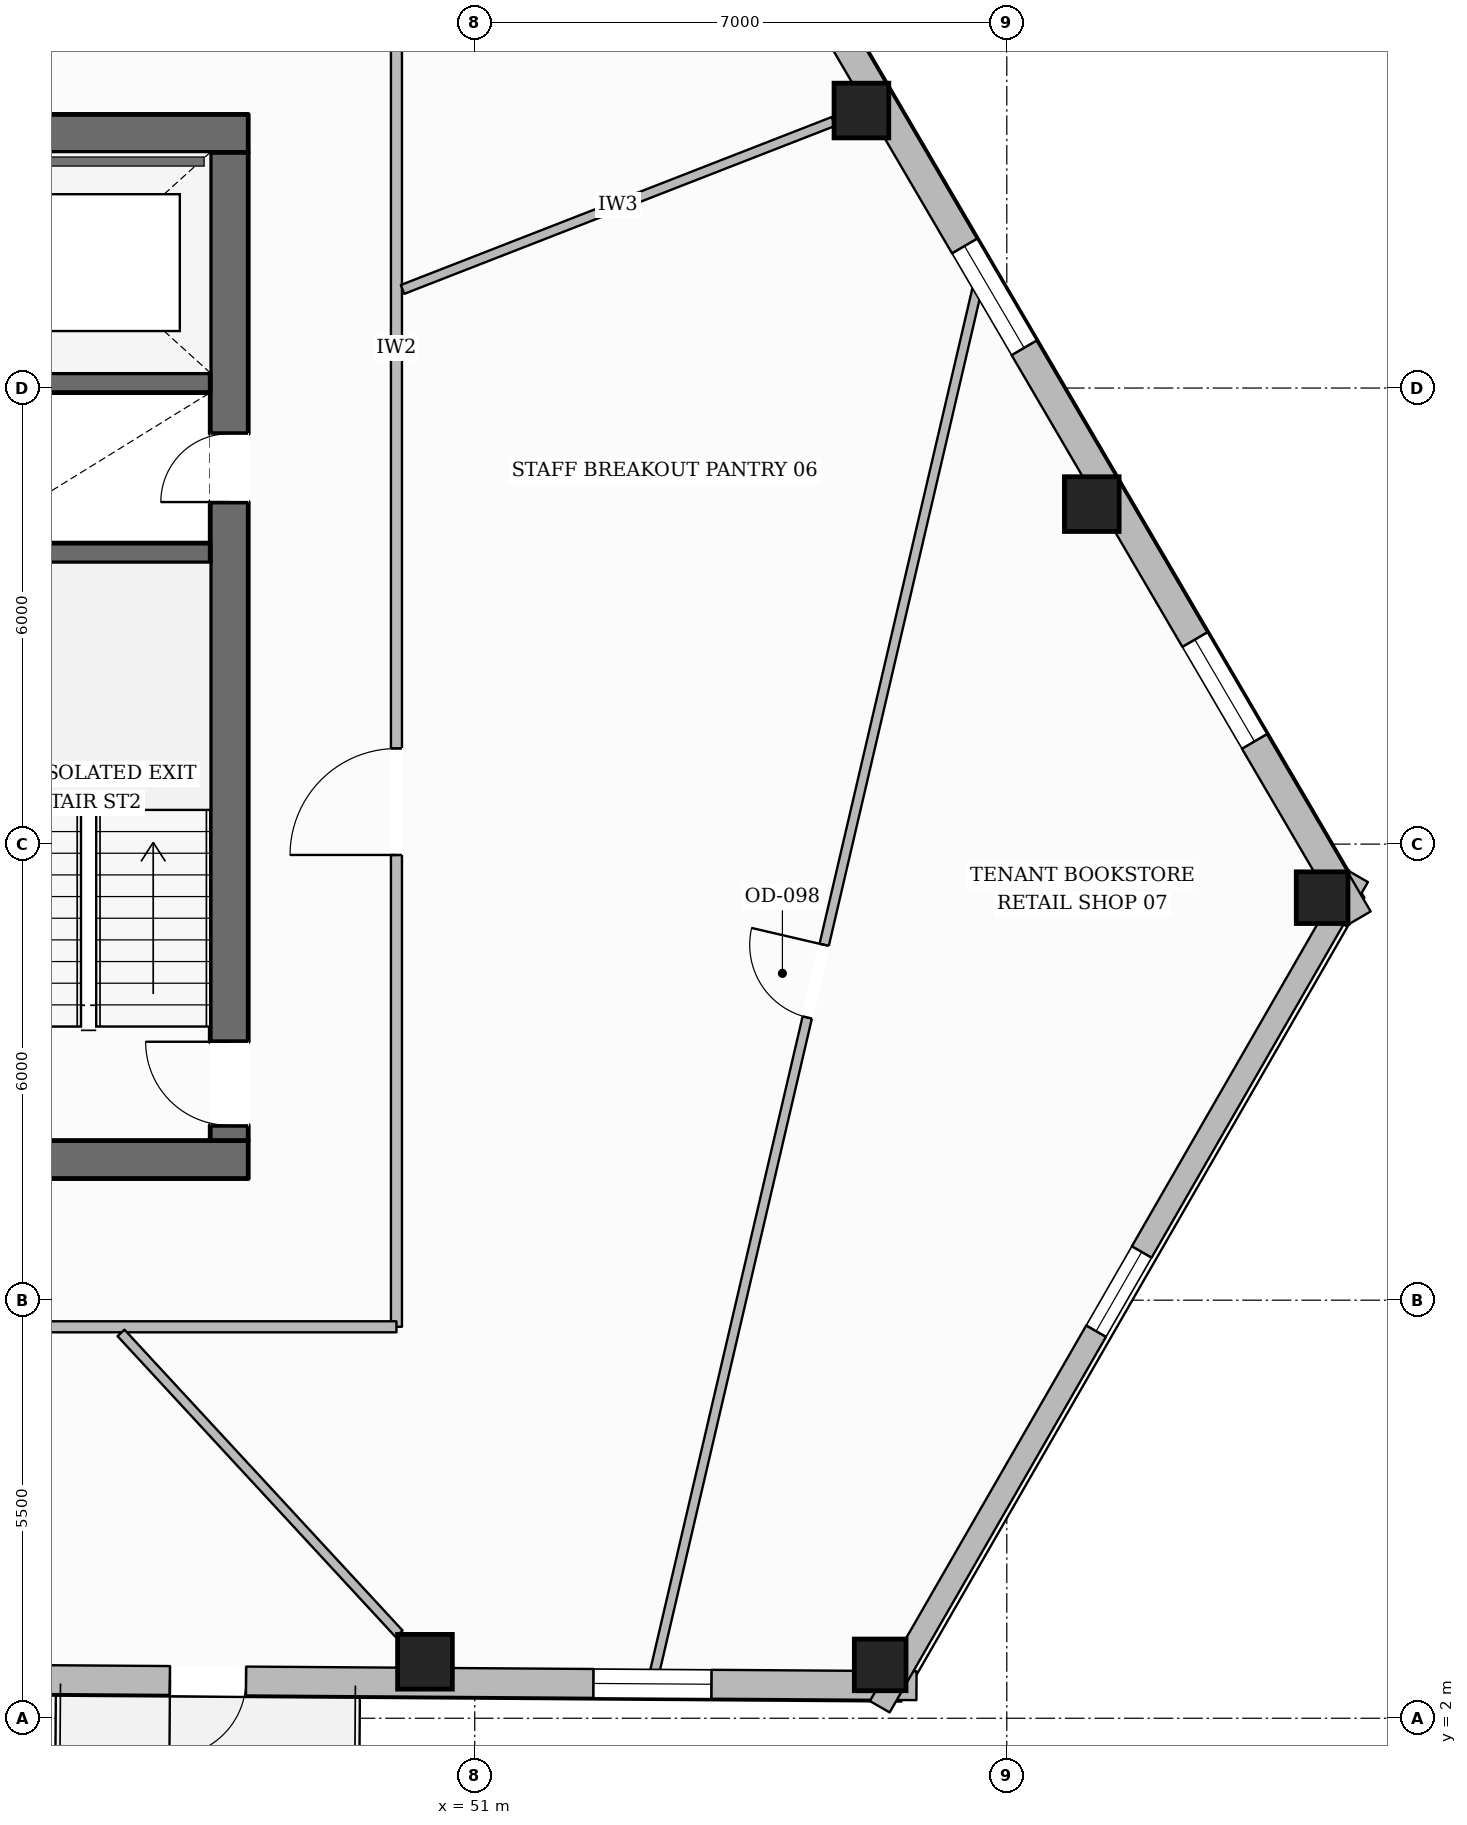
"""IFC4 building model, lengths in metres.
Left out: names, types, materials, properties, quantities, classifications, styles, units other than length and angle.
Written with IfcOpenShell. Run it as: python <this file> out.ifc"""

import sys

from ifc_helpers import new_model, si_unit, direction, frame, frame_2d, origin, origin_2d, place, context, subcontext, project, spatial, rectangle, hollow_rectangle, extrude, element, fill, save


model = new_model("IFC4")
c1 = context("Model", 3, precision=1e-05, world=origin(), true_north=direction((0.0, 1.0)))
c2 = subcontext(c1, "Body", "Model", "MODEL_VIEW")
j1 = project(units=[si_unit("LENGTHUNIT", "METRE"), si_unit("PLANEANGLEUNIT", "RADIAN")], contexts=[c1])
p1 = place(None, origin())
s1 = spatial("IfcSite", under=j1, at=p1, CompositionType="ELEMENT")
p2 = place(p1, origin())
s2 = spatial("IfcBuilding", under=s1, at=p2, CompositionType="ELEMENT")
p3 = place(p2, frame((0.0, 0.0, 120.15)))
s3 = spatial("IfcBuildingStorey", under=s2, at=p3, CompositionType="ELEMENT", Elevation=120.15)
p4 = place(p3, frame((27.98, 9.35, 0.0), z_axis=(0.0, 0.0, 1.0), x_axis=(1.0, 0.0, 0.0)))
e1 = element("IfcWall", 1, at=p4, inside=s3, PredefinedType="SOLIDWALL", context=c2, shape_type="SweptSolid", body=[
    extrude(rectangle(XDim=20.04, YDim=0.5, at=frame_2d((10.02, 0.0))), origin(), (0.0, 0.0, 1.0), 3.6),
])
p5 = place(p4, frame((10.52, 0.0, 0.0)))
e2 = element("IfcOpeningElement", 2, at=p5, cuts=e1, PredefinedType="OPENING", context=c2, shape_type="SweptSolid", body=[
    extrude(rectangle(XDim=1.4, YDim=2.2, at=frame_2d((0.7, 1.1))), frame((0.0, 0.26, 0.0), z_axis=(0.0, -1.0, 0.0), x_axis=(1.0, 0.0, 0.0)), (0.0, 0.0, 1.0), 0.52),
])
p6 = place(p3, frame((27.98, 22.85, 0.0), z_axis=(0.0, 0.0, 1.0), x_axis=(1.0, 0.0, 0.0)))
e3 = element("IfcWall", 3, at=p6, inside=s3, PredefinedType="SOLIDWALL", context=c2, shape_type="SweptSolid", body=[
    extrude(rectangle(XDim=20.04, YDim=0.5, at=frame_2d((10.02, 0.0))), origin(), (0.0, 0.0, 1.0), 3.6),
])
p7 = place(p6, frame((6.295, 0.0, 0.0)))
e4 = element("IfcOpeningElement", 4, at=p7, cuts=e3, PredefinedType="OPENING", context=c2, shape_type="SweptSolid", body=[
    extrude(rectangle(XDim=1.05, YDim=2.15, at=frame_2d((0.525, 1.075))), frame((0.0, 0.26, 0.0), z_axis=(0.0, -1.0, 0.0), x_axis=(1.0, 0.0, 0.0)), (0.0, 0.0, 1.0), 0.52),
])
p8 = place(p6, frame((12.695, 0.0, 0.0)))
e5 = element("IfcOpeningElement", 5, at=p8, cuts=e3, PredefinedType="OPENING", context=c2, shape_type="SweptSolid", body=[
    extrude(rectangle(XDim=1.05, YDim=2.15, at=frame_2d((0.525, 1.075))), frame((0.0, 0.26, 0.0), z_axis=(0.0, -1.0, 0.0), x_axis=(1.0, 0.0, 0.0)), (0.0, 0.0, 1.0), 0.52),
])
p9 = place(p3, frame((47.77, 9.6, 0.0), z_axis=(0.0, 0.0, 1.0), x_axis=(0.0, 1.0, 0.0)))
e6 = element("IfcWall", 6, at=p9, inside=s3, PredefinedType="SOLIDWALL", context=c2, shape_type="SweptSolid", body=[
    extrude(rectangle(XDim=13.0, YDim=0.5, at=frame_2d((6.5, 0.0))), origin(), (0.0, 0.0, 1.0), 3.6),
])
p10 = place(p9, frame((0.2, 0.0, 0.0)))
e7 = element("IfcOpeningElement", 7, at=p10, cuts=e6, PredefinedType="OPENING", context=c2, shape_type="SweptSolid", body=[
    extrude(rectangle(XDim=1.1, YDim=2.15, at=frame_2d((0.55, 1.075))), frame((0.0, 0.26, 0.0), z_axis=(0.0, -1.0, 0.0), x_axis=(1.0, 0.0, 0.0)), (0.0, 0.0, 1.0), 0.52),
])
p11 = place(p9, frame((8.4, 0.0, 0.0)))
e8 = element("IfcOpeningElement", 8, at=p11, cuts=e6, PredefinedType="OPENING", context=c2, shape_type="SweptSolid", body=[
    extrude(rectangle(XDim=0.9, YDim=2.1, at=frame_2d((0.45, 1.05))), frame((0.0, 0.26, 0.0), z_axis=(0.0, -1.0, 0.0), x_axis=(1.0, 0.0, 0.0)), (0.0, 0.0, 1.0), 0.52),
])
for number, where, z_axis, x_axis in (
    (9, (44.32, 17.33, 0.0), (0.0, 0.0, 1.0), (1.0, 0.0, 0.0)),
    (10, (44.32, 19.57, 0.0), (0.0, 0.0, 1.0), (1.0, 0.0, 0.0)),
):
    element("IfcWall", number, at=place(p3, frame(where, z_axis=z_axis, x_axis=x_axis)), inside=s3, PredefinedType="SHEAR", context=c2, shape_type="SweptSolid", body=[
        extrude(rectangle(XDim=3.2, YDim=0.26, at=frame_2d((1.6, 0.0))), origin(), (0.0, 0.0, 1.0), 3.6),
    ])
p12 = place(p3, frame((50.345, 2.743, 0.0), z_axis=(0.0, 0.0, 1.0), x_axis=(1.0, 0.0, 0.0)))
e11 = element("IfcColumn", 11, at=p12, inside=s3, PredefinedType="COLUMN", context=c2, shape_type="SweptSolid", body=[
    extrude(hollow_rectangle(XDim=0.72, YDim=0.72, WallThickness=0.032, at=origin_2d()), origin(), (0.0, 0.0, 1.0), 3.6),
])
for number, where, z_axis, x_axis in (
    (12, (56.334, 2.702, 0.0), (0.0, 0.0, 1.0), (1.0, 0.0, 0.0)),
    (13, (62.148, 12.795, 0.0), (0.0, 0.0, 1.0), (1.0, 0.0, 0.0)),
):
    element("IfcColumn", number, at=place(p3, frame(where, z_axis=z_axis, x_axis=x_axis)), inside=s3, PredefinedType="COLUMN", context=c2, shape_type="SweptSolid", body=[
        extrude(hollow_rectangle(XDim=0.68, YDim=0.68, WallThickness=0.03, at=origin_2d()), origin(), (0.0, 0.0, 1.0), 3.6),
    ])
for number, where, z_axis, x_axis in (
    (14, (59.118, 17.973, 0.0), (0.0, 0.0, 1.0), (1.0, 0.0, 0.0)),
    (15, (56.087, 23.151, 0.0), (0.0, 0.0, 1.0), (1.0, 0.0, 0.0)),
):
    element("IfcColumn", number, at=place(p3, frame(where, z_axis=z_axis, x_axis=x_axis)), inside=s3, PredefinedType="COLUMN", context=c2, shape_type="SweptSolid", body=[
        extrude(hollow_rectangle(XDim=0.72, YDim=0.72, WallThickness=0.032, at=origin_2d()), origin(), (0.0, 0.0, 1.0), 3.6),
    ])
p13 = place(p3, frame((56.812, 2.428, 0.0), z_axis=(0.0, 0.0, 1.0), x_axis=(-0.999975943084, 0.006936371743, 0.0)))
e16 = element("IfcWall", 16, at=p13, inside=s3, PredefinedType="STANDARD", context=c2, shape_type="SweptSolid", body=[
    extrude(rectangle(XDim=36.887, YDim=0.38, at=frame_2d((18.443, 0.0))), origin(), (0.0, 0.0, 1.0), 3.059),
])
p14 = place(p13, frame((8.822, 0.0, 0.0)))
e17 = element("IfcOpeningElement", 17, at=p14, cuts=e16, PredefinedType="OPENING", context=c2, shape_type="SweptSolid", body=[
    extrude(rectangle(XDim=1.0, YDim=2.2, at=frame_2d((0.5, 1.1))), frame((0.0, 0.2, 0.0), z_axis=(0.0, -1.0, 0.0), x_axis=(1.0, 0.0, 0.0)), (0.0, 0.0, 1.0), 0.4),
])
p15 = place(p13, frame((32.644, 0.0, 0.65)))
e18 = element("IfcOpeningElement", 18, at=p15, cuts=e16, PredefinedType="OPENING", context=c2, shape_type="SweptSolid", body=[
    extrude(rectangle(XDim=1.55, YDim=1.75, at=frame_2d((0.775, 0.875))), frame((0.0, 0.2, 0.0), z_axis=(0.0, -1.0, 0.0), x_axis=(1.0, 0.0, 0.0)), (0.0, 0.0, 1.0), 0.4),
])
p16 = place(p13, frame((26.655, 0.0, 0.65)))
e19 = element("IfcOpeningElement", 19, at=p16, cuts=e16, PredefinedType="OPENING", context=c2, shape_type="SweptSolid", body=[
    extrude(rectangle(XDim=1.55, YDim=1.75, at=frame_2d((0.775, 0.875))), frame((0.0, 0.2, 0.0), z_axis=(0.0, -1.0, 0.0), x_axis=(1.0, 0.0, 0.0)), (0.0, 0.0, 1.0), 0.4),
])
p17 = place(p13, frame((20.666, 0.0, 0.65)))
e20 = element("IfcOpeningElement", 20, at=p17, cuts=e16, PredefinedType="OPENING", context=c2, shape_type="SweptSolid", body=[
    extrude(rectangle(XDim=1.55, YDim=1.75, at=frame_2d((0.775, 0.875))), frame((0.0, 0.2, 0.0), z_axis=(0.0, -1.0, 0.0), x_axis=(1.0, 0.0, 0.0)), (0.0, 0.0, 1.0), 0.4),
])
p18 = place(p13, frame((2.699, 0.0, 0.65)))
e21 = element("IfcOpeningElement", 21, at=p18, cuts=e16, PredefinedType="OPENING", context=c2, shape_type="SweptSolid", body=[
    extrude(rectangle(XDim=1.55, YDim=1.75, at=frame_2d((0.775, 0.875))), frame((0.0, 0.2, 0.0), z_axis=(0.0, -1.0, 0.0), x_axis=(1.0, 0.0, 0.0)), (0.0, 0.0, 1.0), 0.4),
])
p19 = place(p3, frame((62.621, 13.075, 0.0), z_axis=(0.0, 0.0, 1.0), x_axis=(-0.499135001454, -0.866524235278, 0.0)))
e22 = element("IfcWall", 22, at=p19, inside=s3, PredefinedType="STANDARD", context=c2, shape_type="SweptSolid", body=[
    extrude(rectangle(XDim=12.607, YDim=0.3, at=frame_2d((6.303, 0.0))), origin(), (0.0, 0.0, 1.0), 3.059),
])
p20 = place(p19, frame((5.704, 0.0, 0.65)))
e23 = element("IfcOpeningElement", 23, at=p20, cuts=e22, PredefinedType="OPENING", context=c2, shape_type="SweptSolid", body=[
    extrude(rectangle(XDim=1.2, YDim=1.7, at=frame_2d((0.6, 0.85))), frame((0.0, 0.16, 0.0), z_axis=(0.0, -1.0, 0.0), x_axis=(1.0, 0.0, 0.0)), (0.0, 0.0, 1.0), 0.32),
])
p21 = place(p3, frame((43.959, 44.406, 0.0), z_axis=(0.0, 0.0, 1.0), x_axis=(0.50514079069, -0.863036952616, 0.0)))
e24 = element("IfcWall", 24, at=p21, inside=s3, PredefinedType="STANDARD", context=c2, shape_type="SweptSolid", body=[
    extrude(rectangle(XDim=36.948, YDim=0.38, at=frame_2d((18.474, 0.0))), origin(), (0.0, 0.0, 1.0), 3.059),
])
p22 = place(p21, frame((32.695, 0.0, 0.65)))
e25 = element("IfcOpeningElement", 25, at=p22, cuts=e24, PredefinedType="OPENING", context=c2, shape_type="SweptSolid", body=[
    extrude(rectangle(XDim=1.55, YDim=1.75, at=frame_2d((0.775, 0.875))), frame((0.0, 0.2, 0.0), z_axis=(0.0, -1.0, 0.0), x_axis=(1.0, 0.0, 0.0)), (0.0, 0.0, 1.0), 0.4),
])
p23 = place(p21, frame((26.696, 0.0, 0.65)))
e26 = element("IfcOpeningElement", 26, at=p23, cuts=e24, PredefinedType="OPENING", context=c2, shape_type="SweptSolid", body=[
    extrude(rectangle(XDim=1.55, YDim=1.75, at=frame_2d((0.775, 0.875))), frame((0.0, 0.2, 0.0), z_axis=(0.0, -1.0, 0.0), x_axis=(1.0, 0.0, 0.0)), (0.0, 0.0, 1.0), 0.4),
])
p24 = place(p21, frame((20.696, 0.0, 0.65)))
e27 = element("IfcOpeningElement", 27, at=p24, cuts=e24, PredefinedType="OPENING", context=c2, shape_type="SweptSolid", body=[
    extrude(rectangle(XDim=1.55, YDim=1.75, at=frame_2d((0.775, 0.875))), frame((0.0, 0.2, 0.0), z_axis=(0.0, -1.0, 0.0), x_axis=(1.0, 0.0, 0.0)), (0.0, 0.0, 1.0), 0.4),
])
p25 = place(p21, frame((8.697, 0.0, 0.65)))
e28 = element("IfcOpeningElement", 28, at=p25, cuts=e24, PredefinedType="OPENING", context=c2, shape_type="SweptSolid", body=[
    extrude(rectangle(XDim=1.55, YDim=1.75, at=frame_2d((0.775, 0.875))), frame((0.0, 0.2, 0.0), z_axis=(0.0, -1.0, 0.0), x_axis=(1.0, 0.0, 0.0)), (0.0, 0.0, 1.0), 0.4),
])
p26 = place(p21, frame((2.698, 0.0, 0.65)))
e29 = element("IfcOpeningElement", 29, at=p26, cuts=e24, PredefinedType="OPENING", context=c2, shape_type="SweptSolid", body=[
    extrude(rectangle(XDim=1.55, YDim=1.75, at=frame_2d((0.775, 0.875))), frame((0.0, 0.2, 0.0), z_axis=(0.0, -1.0, 0.0), x_axis=(1.0, 0.0, 0.0)), (0.0, 0.0, 1.0), 0.4),
])
p27 = place(p3, frame((49.97, 7.15, 0.0), z_axis=(0.0, 0.0, 1.0), x_axis=(0.0, 1.0, 0.0)))
e30 = element("IfcWall", 30, at=p27, inside=s3, PredefinedType="PARTITIONING", context=c2, shape_type="SweptSolid", body=[
    extrude(rectangle(XDim=17.9, YDim=0.145, at=frame_2d((8.95, 0.0))), origin(), (0.0, 0.0, 1.0), 3.288),
])
p28 = place(p27, frame((6.208, 0.0, 0.0)))
e31 = element("IfcOpeningElement", 31, at=p28, cuts=e30, PredefinedType="OPENING", context=c2, shape_type="SweptSolid", body=[
    extrude(rectangle(XDim=1.4, YDim=2.2, at=frame_2d((0.7, 1.1))), frame((0.0, 0.083, 0.0), z_axis=(0.0, -1.0, 0.0), x_axis=(1.0, 0.0, 0.0)), (0.0, 0.0, 1.0), 0.165),
])
p29 = place(p3, frame((26.03, 7.15, 0.0), z_axis=(0.0, 0.0, 1.0), x_axis=(1.0, 0.0, 0.0)))
e32 = element("IfcWall", 32, at=p29, inside=s3, PredefinedType="PARTITIONING", context=c2, shape_type="SweptSolid", body=[
    extrude(rectangle(XDim=23.94, YDim=0.145, at=frame_2d((11.97, 0.0))), origin(), (0.0, 0.0, 1.0), 3.6),
])
p30 = place(p29, frame((4.53, 0.0, 0.0)))
e33 = element("IfcOpeningElement", 33, at=p30, cuts=e32, PredefinedType="OPENING", context=c2, shape_type="SweptSolid", body=[
    extrude(rectangle(XDim=0.88, YDim=2.1, at=frame_2d((0.44, 1.05))), frame((0.0, 0.083, 0.0), z_axis=(0.0, -1.0, 0.0), x_axis=(1.0, 0.0, 0.0)), (0.0, 0.0, 1.0), 0.165),
])
p31 = place(p29, frame((7.05, 0.0, 0.0)))
e34 = element("IfcOpeningElement", 34, at=p31, cuts=e32, PredefinedType="OPENING", context=c2, shape_type="SweptSolid", body=[
    extrude(rectangle(XDim=0.88, YDim=2.1, at=frame_2d((0.44, 1.05))), frame((0.0, 0.083, 0.0), z_axis=(0.0, -1.0, 0.0), x_axis=(1.0, 0.0, 0.0)), (0.0, 0.0, 1.0), 0.165),
])
p32 = place(p29, frame((9.43, 0.0, 0.0)))
e35 = element("IfcOpeningElement", 35, at=p32, cuts=e32, PredefinedType="OPENING", context=c2, shape_type="SweptSolid", body=[
    extrude(rectangle(XDim=0.96, YDim=2.1, at=frame_2d((0.48, 1.05))), frame((0.0, 0.083, 0.0), z_axis=(0.0, -1.0, 0.0), x_axis=(1.0, 0.0, 0.0)), (0.0, 0.0, 1.0), 0.165),
])
p33 = place(p29, frame((14.946, 0.0, 0.0)))
e36 = element("IfcOpeningElement", 36, at=p33, cuts=e32, PredefinedType="OPENING", context=c2, shape_type="SweptSolid", body=[
    extrude(rectangle(XDim=1.4, YDim=2.2, at=frame_2d((0.7, 1.1))), frame((0.0, 0.083, 0.0), z_axis=(0.0, -1.0, 0.0), x_axis=(1.0, 0.0, 0.0)), (0.0, 0.0, 1.0), 0.165),
])
p34 = place(p3, frame((50.051, 20.798, 0.0), z_axis=(0.0, 0.0, 1.0), x_axis=(0.931714445964, 0.363191672786, 0.0)))
e37 = element("IfcWall", 37, at=p34, inside=s3, PredefinedType="PARTITIONING", context=c2, shape_type="SweptSolid", body=[
    extrude(rectangle(XDim=6.084, YDim=0.125, at=frame_2d((3.042, 0.0))), origin(), (0.0, 0.0, 1.0), 3.6),
])
p35 = place(p3, frame((46.347, 7.07, 0.0), z_axis=(0.0, 0.0, 1.0), x_axis=(0.678748401089, -0.734370892683, 0.0)))
e38 = element("IfcWall", 38, at=p35, inside=s3, PredefinedType="PARTITIONING", context=c2, shape_type="SweptSolid", body=[
    extrude(rectangle(XDim=5.39, YDim=0.125, at=frame_2d((2.695, 0.0))), origin(), (0.0, 0.0, 1.0), 3.6),
])
p36 = place(p3, frame((53.365, 2.602, 0.0), z_axis=(0.0, 0.0, 1.0), x_axis=(0.227056479697, 0.973881591893, 0.0)))
e39 = element("IfcWall", 39, at=p36, inside=s3, PredefinedType="PARTITIONING", context=c2, shape_type="SweptSolid", body=[
    extrude(rectangle(XDim=18.678, YDim=0.125, at=frame_2d((9.339, 0.0))), origin(), (0.0, 0.0, 1.0), 3.288),
])
p37 = place(p36, frame((8.849, 0.0, 0.0)))
e40 = element("IfcOpeningElement", 40, at=p37, cuts=e39, PredefinedType="OPENING", context=c2, shape_type="SweptSolid", body=[
    extrude(rectangle(XDim=0.98, YDim=2.15, at=frame_2d((0.49, 1.075))), frame((0.0, 0.073, 0.0), z_axis=(0.0, -1.0, 0.0), x_axis=(1.0, 0.0, 0.0)), (0.0, 0.0, 1.0), 0.145),
])
p38 = place(p14, origin())
e41 = element("IfcDoor", 41, at=p38, inside=s3, OperationType="SINGLE_SWING_RIGHT", PredefinedType="DOOR", context=c2, shape_type="SweptSolid", body=[
    extrude(rectangle(XDim=1.0, YDim=2.2, at=frame_2d((0.5, 1.1))), frame((0.0, 0.025, 0.0), z_axis=(0.0, -1.0, 0.0), x_axis=(1.0, 0.0, 0.0)), (0.0, 0.0, 1.0), 0.05),
])
fill(e17, e41)
p39 = place(p18, origin())
e42 = element("IfcWindow", 42, at=p39, inside=s3, PartitioningType="SINGLE_PANEL", PredefinedType="WINDOW", context=c2, shape_type="SweptSolid", body=[
    extrude(rectangle(XDim=1.55, YDim=1.75, at=frame_2d((0.775, 0.875))), frame((0.0, 0.03, 0.0), z_axis=(0.0, -1.0, 0.0), x_axis=(1.0, 0.0, 0.0)), (0.0, 0.0, 1.0), 0.06),
])
fill(e21, e42)
p40 = place(p22, origin())
e43 = element("IfcWindow", 43, at=p40, inside=s3, PartitioningType="SINGLE_PANEL", PredefinedType="WINDOW", context=c2, shape_type="SweptSolid", body=[
    extrude(rectangle(XDim=1.55, YDim=1.75, at=frame_2d((0.775, 0.875))), frame((0.0, 0.03, 0.0), z_axis=(0.0, -1.0, 0.0), x_axis=(1.0, 0.0, 0.0)), (0.0, 0.0, 1.0), 0.06),
])
fill(e25, e43)
p41 = place(p23, origin())
e44 = element("IfcWindow", 44, at=p41, inside=s3, PartitioningType="SINGLE_PANEL", PredefinedType="WINDOW", context=c2, shape_type="SweptSolid", body=[
    extrude(rectangle(XDim=1.55, YDim=1.75, at=frame_2d((0.775, 0.875))), frame((0.0, 0.03, 0.0), z_axis=(0.0, -1.0, 0.0), x_axis=(1.0, 0.0, 0.0)), (0.0, 0.0, 1.0), 0.06),
])
fill(e26, e44)
p42 = place(p20, origin())
e45 = element("IfcWindow", 45, at=p42, inside=s3, PartitioningType="SINGLE_PANEL", PredefinedType="WINDOW", context=c2, shape_type="SweptSolid", body=[
    extrude(rectangle(XDim=1.2, YDim=1.7, at=frame_2d((0.6, 0.85))), frame((0.0, 0.03, 0.0), z_axis=(0.0, -1.0, 0.0), x_axis=(1.0, 0.0, 0.0)), (0.0, 0.0, 1.0), 0.06),
])
fill(e23, e45)
p43 = place(p10, origin())
e46 = element("IfcDoor", 46, at=p43, inside=s3, OperationType="SINGLE_SWING_RIGHT", PredefinedType="DOOR", context=c2, shape_type="SweptSolid", body=[
    extrude(rectangle(XDim=1.1, YDim=2.15, at=frame_2d((0.55, 1.075))), frame((0.0, 0.025, 0.0), z_axis=(0.0, -1.0, 0.0), x_axis=(1.0, 0.0, 0.0)), (0.0, 0.0, 1.0), 0.05),
])
fill(e7, e46)
p44 = place(p11, origin())
e47 = element("IfcDoor", 47, at=p44, inside=s3, OperationType="SINGLE_SWING_LEFT", PredefinedType="DOOR", context=c2, shape_type="SweptSolid", body=[
    extrude(rectangle(XDim=0.9, YDim=2.1, at=frame_2d((0.45, 1.05))), frame((0.0, 0.025, 0.0), z_axis=(0.0, -1.0, 0.0), x_axis=(1.0, 0.0, 0.0)), (0.0, 0.0, 1.0), 0.05),
])
fill(e8, e47)
p45 = place(p28, origin())
e48 = element("IfcDoor", 48, at=p45, inside=s3, OperationType="SINGLE_SWING_LEFT", PredefinedType="DOOR", context=c2, shape_type="SweptSolid", body=[
    extrude(rectangle(XDim=1.4, YDim=2.2, at=frame_2d((0.7, 1.1))), frame((0.0, 0.025, 0.0), z_axis=(0.0, -1.0, 0.0), x_axis=(1.0, 0.0, 0.0)), (0.0, 0.0, 1.0), 0.05),
])
fill(e31, e48)
p46 = place(p37, origin())
e49 = element("IfcDoor", 49, at=p46, inside=s3, OperationType="SINGLE_SWING_RIGHT", PredefinedType="DOOR", context=c2, shape_type="SweptSolid", body=[
    extrude(rectangle(XDim=0.98, YDim=2.15, at=frame_2d((0.49, 1.075))), frame((0.0, 0.025, 0.0), z_axis=(0.0, -1.0, 0.0), x_axis=(1.0, 0.0, 0.0)), (0.0, 0.0, 1.0), 0.05),
])
fill(e40, e49)
save(model, sys.argv[1])
